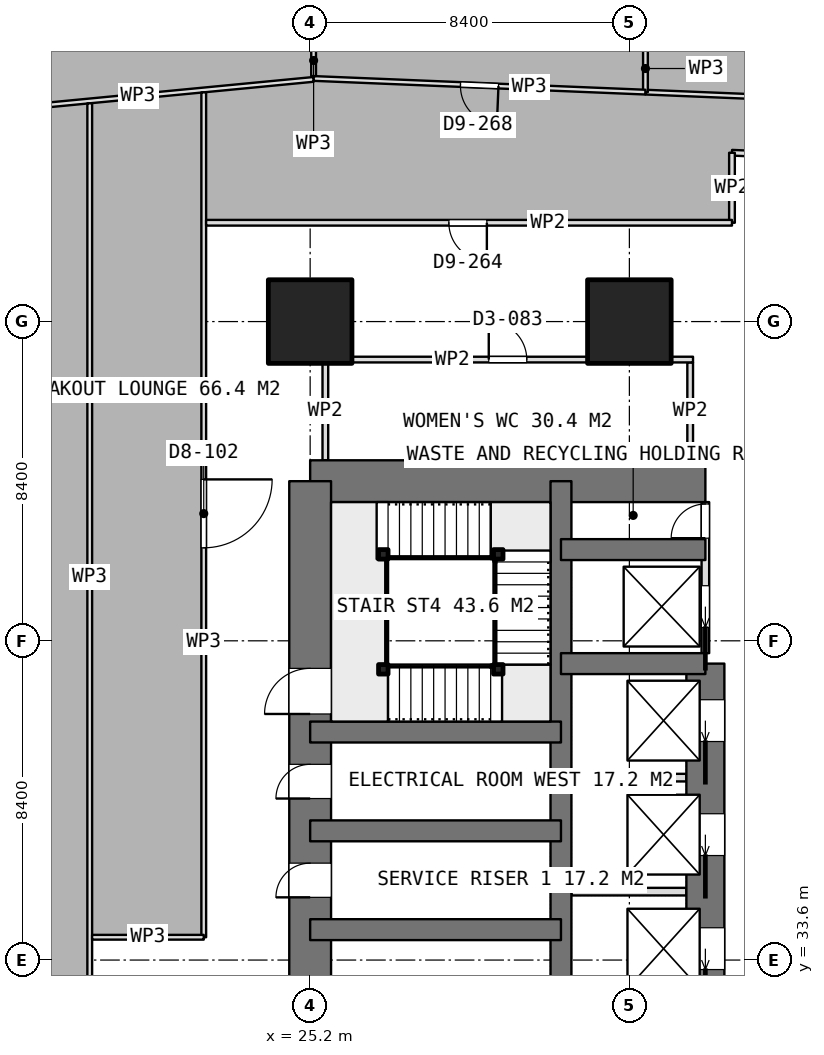
"""IFC4 building model, lengths in metres.
Left out: names, types, materials, properties, quantities, classifications, styles, units other than length and angle.
Written with IfcOpenShell. Run it as: python <this file> out.ifc"""

import sys

from ifc_helpers import new_model, si_unit, direction, frame, frame_2d, origin, origin_2d, place, context, subcontext, project, spatial, rectangle, extrude, element, fill, save


model = new_model("IFC4")
c1 = context("Model", 3, precision=1e-05, world=origin(), true_north=direction((0.0, 1.0)))
c2 = subcontext(c1, "Body", "Model", "MODEL_VIEW")
j1 = project(units=[si_unit("LENGTHUNIT", "METRE"), si_unit("PLANEANGLEUNIT", "RADIAN")], contexts=[c1])
p1 = place(None, origin())
s1 = spatial("IfcSite", under=j1, at=p1, CompositionType="ELEMENT")
p2 = place(p1, origin())
s2 = spatial("IfcBuilding", under=s1, at=p2, CompositionType="ELEMENT")
p3 = place(p2, frame((0.0, 0.0, 74.15)))
s3 = spatial("IfcBuildingStorey", under=s2, at=p3, CompositionType="ELEMENT", Elevation=74.15)
p4 = place(p3, frame((25.2, 46.2, 0.0), z_axis=(0.0, 0.0, 1.0), x_axis=(1.0, 0.0, 0.0)))
e1 = element("IfcWall", 1, at=p4, inside=s3, PredefinedType="SHEAR", context=c2, shape_type="SweptSolid", body=[
    extrude(rectangle(XDim=10.4, YDim=1.1, at=frame_2d((5.2, 0.0))), origin(), (0.0, 0.0, 1.0), 3.75),
])
p5 = place(p3, frame((25.2, 21.0, 0.0), z_axis=(0.0, 0.0, 1.0), x_axis=(0.0, 1.0, 0.0)))
e2 = element("IfcWall", 2, at=p5, inside=s3, PredefinedType="SHEAR", context=c2, shape_type="SweptSolid", body=[
    extrude(rectangle(XDim=25.2, YDim=1.1, at=frame_2d((12.6, 0.0))), origin(), (0.0, 0.0, 1.0), 3.75),
])
p6 = place(p5, frame((7.8, 0.0, 0.0)))
e3 = element("IfcOpeningElement", 3, at=p6, cuts=e2, PredefinedType="OPENING", context=c2, shape_type="SweptSolid", body=[
    extrude(rectangle(XDim=1.2, YDim=2.1, at=frame_2d((0.6, 1.05))), frame((0.0, 0.56, 0.0), z_axis=(0.0, -1.0, 0.0), x_axis=(1.0, 0.0, 0.0)), (0.0, 0.0, 1.0), 1.12),
])
p7 = place(p5, frame((14.25, 0.0, 0.0)))
e4 = element("IfcOpeningElement", 4, at=p7, cuts=e2, PredefinedType="OPENING", context=c2, shape_type="SweptSolid", body=[
    extrude(rectangle(XDim=0.9, YDim=2.1, at=frame_2d((0.45, 1.05))), frame((0.0, 0.56, 0.0), z_axis=(0.0, -1.0, 0.0), x_axis=(1.0, 0.0, 0.0)), (0.0, 0.0, 1.0), 1.12),
])
p8 = place(p5, frame((16.85, 0.0, 0.0)))
e5 = element("IfcOpeningElement", 5, at=p8, cuts=e2, PredefinedType="OPENING", context=c2, shape_type="SweptSolid", body=[
    extrude(rectangle(XDim=0.9, YDim=2.1, at=frame_2d((0.45, 1.05))), frame((0.0, 0.56, 0.0), z_axis=(0.0, -1.0, 0.0), x_axis=(1.0, 0.0, 0.0)), (0.0, 0.0, 1.0), 1.12),
])
p9 = place(p5, frame((19.075, 0.0, 0.0)))
e6 = element("IfcOpeningElement", 6, at=p9, cuts=e2, PredefinedType="OPENING", context=c2, shape_type="SweptSolid", body=[
    extrude(rectangle(XDim=1.2, YDim=2.1, at=frame_2d((0.6, 1.05))), frame((0.0, 0.56, 0.0), z_axis=(0.0, -1.0, 0.0), x_axis=(1.0, 0.0, 0.0)), (0.0, 0.0, 1.0), 1.12),
])
p10 = place(p3, frame((31.8, 21.0, 0.0), z_axis=(0.0, 0.0, 1.0), x_axis=(0.0, 1.0, 0.0)))
e7 = element("IfcWall", 7, at=p10, inside=s3, PredefinedType="SHEAR", context=c2, shape_type="SweptSolid", body=[
    extrude(rectangle(XDim=25.2, YDim=0.55, at=frame_2d((12.6, 0.0))), origin(), (0.0, 0.0, 1.0), 3.75),
])
p11 = place(p3, frame((35.6, 23.4, 0.0), z_axis=(0.0, 0.0, 1.0), x_axis=(0.0, 1.0, 0.0)))
e8 = element("IfcWall", 8, at=p11, inside=s3, PredefinedType="SHEAR", context=c2, shape_type="SweptSolid", body=[
    extrude(rectangle(XDim=18.0, YDim=1.0, at=frame_2d((9.0, 0.0))), origin(), (0.0, 0.0, 1.0), 3.75),
])
p12 = place(p11, frame((0.95, 0.0, 0.0)))
e9 = element("IfcOpeningElement", 9, at=p12, cuts=e8, PredefinedType="OPENING", context=c2, shape_type="SweptSolid", body=[
    extrude(rectangle(XDim=1.1, YDim=2.1, at=frame_2d((0.55, 1.05))), frame((0.0, 0.51, 0.0), z_axis=(0.0, -1.0, 0.0), x_axis=(1.0, 0.0, 0.0)), (0.0, 0.0, 1.0), 1.02),
])
p13 = place(p11, frame((3.95, 0.0, 0.0)))
e10 = element("IfcOpeningElement", 10, at=p13, cuts=e8, PredefinedType="OPENING", context=c2, shape_type="SweptSolid", body=[
    extrude(rectangle(XDim=1.1, YDim=2.1, at=frame_2d((0.55, 1.05))), frame((0.0, 0.51, 0.0), z_axis=(0.0, -1.0, 0.0), x_axis=(1.0, 0.0, 0.0)), (0.0, 0.0, 1.0), 1.02),
])
p14 = place(p11, frame((6.95, 0.0, 0.0)))
e11 = element("IfcOpeningElement", 11, at=p14, cuts=e8, PredefinedType="OPENING", context=c2, shape_type="SweptSolid", body=[
    extrude(rectangle(XDim=1.1, YDim=2.1, at=frame_2d((0.55, 1.05))), frame((0.0, 0.51, 0.0), z_axis=(0.0, -1.0, 0.0), x_axis=(1.0, 0.0, 0.0)), (0.0, 0.0, 1.0), 1.02),
])
p15 = place(p11, frame((9.95, 0.0, 0.0)))
e12 = element("IfcOpeningElement", 12, at=p15, cuts=e8, PredefinedType="OPENING", context=c2, shape_type="SweptSolid", body=[
    extrude(rectangle(XDim=1.1, YDim=2.1, at=frame_2d((0.55, 1.05))), frame((0.0, 0.51, 0.0), z_axis=(0.0, -1.0, 0.0), x_axis=(1.0, 0.0, 0.0)), (0.0, 0.0, 1.0), 1.02),
])
p16 = place(p11, frame((12.95, 0.0, 0.0)))
e13 = element("IfcOpeningElement", 13, at=p16, cuts=e8, PredefinedType="OPENING", context=c2, shape_type="SweptSolid", body=[
    extrude(rectangle(XDim=1.1, YDim=2.1, at=frame_2d((0.55, 1.05))), frame((0.0, 0.51, 0.0), z_axis=(0.0, -1.0, 0.0), x_axis=(1.0, 0.0, 0.0)), (0.0, 0.0, 1.0), 1.02),
])
p17 = place(p11, frame((15.95, 0.0, 0.0)))
e14 = element("IfcOpeningElement", 14, at=p17, cuts=e8, PredefinedType="OPENING", context=c2, shape_type="SweptSolid", body=[
    extrude(rectangle(XDim=1.1, YDim=2.1, at=frame_2d((0.55, 1.05))), frame((0.0, 0.51, 0.0), z_axis=(0.0, -1.0, 0.0), x_axis=(1.0, 0.0, 0.0)), (0.0, 0.0, 1.0), 1.02),
])
for number, where, z_axis, x_axis in (
    (15, (31.8, 41.4, 0.0), (0.0, 0.0, 1.0), (1.0, 0.0, 0.0)),
    (16, (31.8, 44.4, 0.0), (0.0, 0.0, 1.0), (1.0, 0.0, 0.0)),
):
    element("IfcWall", number, at=place(p3, frame(where, z_axis=z_axis, x_axis=x_axis)), inside=s3, PredefinedType="SHEAR", context=c2, shape_type="SweptSolid", body=[
        extrude(rectangle(XDim=3.8, YDim=0.55, at=frame_2d((1.9, 0.0))), origin(), (0.0, 0.0, 1.0), 3.75),
    ])
for number, where, z_axis, x_axis in (
    (17, (25.2, 34.4, 0.0), (0.0, 0.0, 1.0), (1.0, 0.0, 0.0)),
    (18, (25.2, 37.0, 0.0), (0.0, 0.0, 1.0), (1.0, 0.0, 0.0)),
    (19, (25.2, 39.6, 0.0), (0.0, 0.0, 1.0), (1.0, 0.0, 0.0)),
):
    element("IfcWall", number, at=place(p3, frame(where, z_axis=z_axis, x_axis=x_axis)), inside=s3, PredefinedType="SHEAR", context=c2, shape_type="SweptSolid", body=[
        extrude(rectangle(XDim=6.6, YDim=0.55, at=frame_2d((3.3, 0.0))), origin(), (0.0, 0.0, 1.0), 3.75),
    ])
for number, where, z_axis, x_axis in (
    (20, (25.2, 50.4, 0.0), (0.0, 0.0, 1.0), (1.0, 0.0, 0.0)),
    (21, (33.6, 50.4, 0.0), (0.0, 0.0, 1.0), (1.0, 0.0, 0.0)),
):
    element("IfcColumn", number, at=place(p3, frame(where, z_axis=z_axis, x_axis=x_axis)), inside=s3, PredefinedType="COLUMN", context=c2, shape_type="SweptSolid", body=[
        extrude(rectangle(XDim=2.2, YDim=2.2, at=origin_2d()), origin(), (0.0, 0.0, 1.0), 3.75),
    ])
for number, where, z_axis, x_axis in (
    (22, (32.075, 35.4, 0.0), (0.0, 0.0, 1.0), (1.0, 0.0, 0.0)),
    (23, (32.075, 38.4, 0.0), (0.0, 0.0, 1.0), (1.0, 0.0, 0.0)),
):
    element("IfcWall", number, at=place(p3, frame(where, z_axis=z_axis, x_axis=x_axis)), inside=s3, PredefinedType="PARTITIONING", context=c2, shape_type="SweptSolid", body=[
        extrude(rectangle(XDim=3.025, YDim=0.2, at=frame_2d((1.513, 0.0))), origin(), (0.0, 0.0, 1.0), 3.5),
    ])
p18 = place(p3, frame((35.6, 41.675, 0.0), z_axis=(0.0, 0.0, 1.0), x_axis=(0.0, 1.0, 0.0)))
e24 = element("IfcWall", 24, at=p18, inside=s3, PredefinedType="PARTITIONING", context=c2, shape_type="SweptSolid", body=[
    extrude(rectangle(XDim=3.975, YDim=0.2, at=frame_2d((1.987, 0.0))), origin(), (0.0, 0.0, 1.0), 3.5),
])
p19 = place(p18, frame((3.025, 0.0, 0.0)))
e25 = element("IfcOpeningElement", 25, at=p19, cuts=e24, PredefinedType="OPENING", context=c2, shape_type="SweptSolid", body=[
    extrude(rectangle(XDim=0.9, YDim=2.1, at=frame_2d((0.45, 1.05))), frame((0.0, 0.11, 0.0), z_axis=(0.0, -1.0, 0.0), x_axis=(1.0, 0.0, 0.0)), (0.0, 0.0, 1.0), 0.22),
])
p20 = place(p18, frame((0.675, 0.0, 0.0)))
e26 = element("IfcOpeningElement", 26, at=p20, cuts=e24, PredefinedType="OPENING", context=c2, shape_type="SweptSolid", body=[
    extrude(rectangle(XDim=1.1, YDim=2.1, at=frame_2d((0.55, 1.05))), frame((0.0, 0.11, 0.0), z_axis=(0.0, -1.0, 0.0), x_axis=(1.0, 0.0, 0.0)), (0.0, 0.0, 1.0), 0.22),
])
p21 = place(p3, frame((25.525, 49.4, 0.0), z_axis=(0.0, 0.0, 1.0), x_axis=(1.0, 0.0, 0.0)))
e27 = element("IfcWall", 27, at=p21, inside=s3, PredefinedType="PARTITIONING", context=c2, shape_type="SweptSolid", body=[
    extrude(rectangle(XDim=9.75, YDim=0.15, at=frame_2d((4.875, 0.0))), origin(), (0.0, 0.0, 1.0), 3.5),
])
p22 = place(p21, frame((4.375, 0.0, 0.0)))
e28 = element("IfcOpeningElement", 28, at=p22, cuts=e27, PredefinedType="OPENING", context=c2, shape_type="SweptSolid", body=[
    extrude(rectangle(XDim=1.0, YDim=2.1, at=frame_2d((0.5, 1.05))), frame((0.0, 0.085, 0.0), z_axis=(0.0, -1.0, 0.0), x_axis=(1.0, 0.0, 0.0)), (0.0, 0.0, 1.0), 0.17),
])
for number, where, z_axis, x_axis in (
    (29, (25.6, 46.75, 0.0), (0.0, 0.0, 1.0), (0.0, 1.0, 0.0)),
    (30, (35.2, 46.75, 0.0), (0.0, 0.0, 1.0), (0.0, 1.0, 0.0)),
):
    element("IfcWall", number, at=place(p3, frame(where, z_axis=z_axis, x_axis=x_axis)), inside=s3, PredefinedType="PARTITIONING", context=c2, shape_type="SweptSolid", body=[
        extrude(rectangle(XDim=2.575, YDim=0.15, at=frame_2d((1.288, 0.0))), origin(), (0.0, 0.0, 1.0), 3.5),
    ])
p23 = place(p3, frame((42.718, 56.078, 0.0), z_axis=(0.0, 0.0, 1.0), x_axis=(-0.99914812822, 0.041267637136, 0.0)))
e31 = element("IfcWall", 31, at=p23, inside=s3, PredefinedType="PARTITIONING", context=c2, shape_type="SweptSolid", body=[
    extrude(rectangle(XDim=8.702, YDim=0.125, at=frame_2d((4.351, 0.0))), origin(), (0.0, 0.0, 1.0), 3.5),
])
p24 = place(p23, frame((3.851, 0.0, 0.0)))
e32 = element("IfcOpeningElement", 32, at=p24, cuts=e31, PredefinedType="OPENING", context=c2, shape_type="SweptSolid", body=[
    extrude(rectangle(XDim=1.0, YDim=2.1, at=frame_2d((0.5, 1.05))), frame((0.0, 0.073, 0.0), z_axis=(0.0, -1.0, 0.0), x_axis=(1.0, 0.0, 0.0)), (0.0, 0.0, 1.0), 0.145),
])
p25 = place(p3, frame((34.023, 56.437, 0.0), z_axis=(0.0, 0.0, 1.0), x_axis=(0.0, 1.0, 0.0)))
e33 = element("IfcWall", 33, at=p25, inside=s3, PredefinedType="PARTITIONING", context=c2, shape_type="SweptSolid", body=[
    extrude(rectangle(XDim=1.243, YDim=0.125, at=frame_2d((0.622, 0.0))), origin(), (0.0, 0.0, 1.0), 3.5),
])
p26 = place(p3, frame((34.021, 56.437, 0.0), z_axis=(0.0, 0.0, 1.0), x_axis=(-0.999150892364, 0.041200658827, 0.0)))
e34 = element("IfcWall", 34, at=p26, inside=s3, PredefinedType="PARTITIONING", context=c2, shape_type="SweptSolid", body=[
    extrude(rectangle(XDim=8.74, YDim=0.125, at=frame_2d((4.37, 0.0))), origin(), (0.0, 0.0, 1.0), 3.5),
])
p27 = place(p26, frame((3.869, 0.0, 0.0)))
e35 = element("IfcOpeningElement", 35, at=p27, cuts=e34, PredefinedType="OPENING", context=c2, shape_type="SweptSolid", body=[
    extrude(rectangle(XDim=1.0, YDim=2.1, at=frame_2d((0.5, 1.05))), frame((0.0, 0.073, 0.0), z_axis=(0.0, -1.0, 0.0), x_axis=(1.0, 0.0, 0.0)), (0.0, 0.0, 1.0), 0.145),
])
p28 = place(p3, frame((25.291, 56.859, 0.0), z_axis=(0.0, 0.0, 1.0), x_axis=(0.0, 1.0, 0.0)))
e36 = element("IfcWall", 36, at=p28, inside=s3, PredefinedType="PARTITIONING", context=c2, shape_type="SweptSolid", body=[
    extrude(rectangle(XDim=0.821, YDim=0.125, at=frame_2d((0.411, 0.0))), origin(), (0.0, 0.0, 1.0), 3.5),
])
p29 = place(p3, frame((25.287, 56.772, 0.0), z_axis=(0.0, 0.0, 1.0), x_axis=(-0.995407630517, -0.095726950797, 0.0)))
e37 = element("IfcWall", 37, at=p29, inside=s3, PredefinedType="PARTITIONING", context=c2, shape_type="SweptSolid", body=[
    extrude(rectangle(XDim=9.276, YDim=0.125, at=frame_2d((4.638, 0.0))), origin(), (0.0, 0.0, 1.0), 3.5),
])
p30 = place(p3, frame((19.4, 56.143, 0.0), z_axis=(0.0, 0.0, 1.0), x_axis=(0.0, -1.0, 0.0)))
e38 = element("IfcWall", 38, at=p30, inside=s3, PredefinedType="PARTITIONING", context=c2, shape_type="SweptSolid", body=[
    extrude(rectangle(XDim=24.943, YDim=0.125, at=frame_2d((12.472, 0.0))), origin(), (0.0, 0.0, 1.0), 3.5),
])
p31 = place(p3, frame((22.4, 56.431, 0.0), z_axis=(0.0, 0.0, 1.0), x_axis=(0.0, -1.0, 0.0)))
e39 = element("IfcWall", 39, at=p31, inside=s3, PredefinedType="PARTITIONING", context=c2, shape_type="SweptSolid", body=[
    extrude(rectangle(XDim=22.231, YDim=0.125, at=frame_2d((11.115, 0.0))), origin(), (0.0, 0.0, 1.0), 3.5),
])
p32 = place(p31, frame((10.184, 0.0, 0.0)))
e40 = element("IfcOpeningElement", 40, at=p32, cuts=e39, PredefinedType="OPENING", context=c2, shape_type="SweptSolid", body=[
    extrude(rectangle(XDim=1.8, YDim=2.1, at=frame_2d((0.9, 1.05))), frame((0.0, 0.073, 0.0), z_axis=(0.0, -1.0, 0.0), x_axis=(1.0, 0.0, 0.0)), (0.0, 0.0, 1.0), 0.145),
])
p33 = place(p3, frame((22.4, 34.2, 0.0), z_axis=(0.0, 0.0, 1.0), x_axis=(-1.0, 0.0, 0.0)))
e41 = element("IfcWall", 41, at=p33, inside=s3, PredefinedType="PARTITIONING", context=c2, shape_type="SweptSolid", body=[
    extrude(rectangle(XDim=2.938, YDim=0.125, at=frame_2d((1.469, 0.0))), origin(), (0.0, 0.0, 1.0), 3.5),
])
p34 = place(p3, frame((39.3, 54.718, 0.0), z_axis=(0.0, 0.0, 1.0), x_axis=(-0.999146548644, 0.041305863176, 0.0)))
e42 = element("IfcWall", 42, at=p34, inside=s3, PredefinedType="PARTITIONING", context=c2, shape_type="SweptSolid", body=[
    extrude(rectangle(XDim=3.002, YDim=0.15, at=frame_2d((1.501, 0.0))), origin(), (0.0, 0.0, 1.0), 3.5),
])
p35 = place(p3, frame((36.3, 54.842, 0.0), z_axis=(0.0, 0.0, 1.0), x_axis=(0.0, -1.0, 0.0)))
e43 = element("IfcWall", 43, at=p35, inside=s3, PredefinedType="PARTITIONING", context=c2, shape_type="SweptSolid", body=[
    extrude(rectangle(XDim=1.842, YDim=0.15, at=frame_2d((0.921, 0.0))), origin(), (0.0, 0.0, 1.0), 3.5),
])
p36 = place(p3, frame((36.3, 53.0, 0.0), z_axis=(0.0, 0.0, 1.0), x_axis=(-1.0, 0.0, 0.0)))
e44 = element("IfcWall", 44, at=p36, inside=s3, PredefinedType="PARTITIONING", context=c2, shape_type="SweptSolid", body=[
    extrude(rectangle(XDim=13.838, YDim=0.15, at=frame_2d((6.919, 0.0))), origin(), (0.0, 0.0, 1.0), 3.5),
])
p37 = place(p36, frame((6.45, 0.0, 0.0)))
e45 = element("IfcOpeningElement", 45, at=p37, cuts=e44, PredefinedType="OPENING", context=c2, shape_type="SweptSolid", body=[
    extrude(rectangle(XDim=1.0, YDim=2.1, at=frame_2d((0.5, 1.05))), frame((0.0, 0.085, 0.0), z_axis=(0.0, -1.0, 0.0), x_axis=(1.0, 0.0, 0.0)), (0.0, 0.0, 1.0), 0.17),
])
for number, where, z_axis, x_axis in (
    (46, (27.125, 41.25, 0.0), (0.0, 0.0, 1.0), (1.0, 0.0, 0.0)),
    (47, (30.15, 41.25, 0.0), (0.0, 0.0, 1.0), (1.0, 0.0, 0.0)),
    (48, (30.15, 44.275, 0.0), (0.0, 0.0, 1.0), (1.0, 0.0, 0.0)),
    (49, (27.125, 44.275, 0.0), (0.0, 0.0, 1.0), (1.0, 0.0, 0.0)),
):
    element("IfcColumn", number, at=place(p3, frame(where, z_axis=z_axis, x_axis=x_axis)), inside=s3, PredefinedType="COLUMN", context=c2, shape_type="SweptSolid", body=[
        extrude(rectangle(XDim=0.25, YDim=0.25, at=origin_2d()), origin(), (0.0, 0.0, 1.0), 3.75),
    ])
p38 = place(p7, origin())
e50 = element("IfcDoor", 50, at=p38, inside=s3, OperationType="SINGLE_SWING_LEFT", PredefinedType="DOOR", context=c2, shape_type="SweptSolid", body=[
    extrude(rectangle(XDim=0.9, YDim=2.1, at=frame_2d((0.45, 1.05))), frame((0.0, 0.025, 0.0), z_axis=(0.0, -1.0, 0.0), x_axis=(1.0, 0.0, 0.0)), (0.0, 0.0, 1.0), 0.05),
])
fill(e4, e50)
p39 = place(p8, origin())
e51 = element("IfcDoor", 51, at=p39, inside=s3, OperationType="SINGLE_SWING_LEFT", PredefinedType="DOOR", context=c2, shape_type="SweptSolid", body=[
    extrude(rectangle(XDim=0.9, YDim=2.1, at=frame_2d((0.45, 1.05))), frame((0.0, 0.025, 0.0), z_axis=(0.0, -1.0, 0.0), x_axis=(1.0, 0.0, 0.0)), (0.0, 0.0, 1.0), 0.05),
])
fill(e5, e51)
p40 = place(p19, origin())
e52 = element("IfcDoor", 52, at=p40, inside=s3, OperationType="SINGLE_SWING_LEFT", PredefinedType="DOOR", context=c2, shape_type="SweptSolid", body=[
    extrude(rectangle(XDim=0.9, YDim=2.1, at=frame_2d((0.45, 1.05))), frame((0.0, 0.025, 0.0), z_axis=(0.0, -1.0, 0.0), x_axis=(1.0, 0.0, 0.0)), (0.0, 0.0, 1.0), 0.05),
])
fill(e25, e52)
p41 = place(p15, origin())
e53 = element("IfcDoor", 53, at=p41, inside=s3, OperationType="SLIDING_TO_LEFT", PredefinedType="USERDEFINED", context=c2, shape_type="SweptSolid", body=[
    extrude(rectangle(XDim=1.1, YDim=2.1, at=frame_2d((0.55, 1.05))), frame((0.0, 0.025, 0.0), z_axis=(0.0, -1.0, 0.0), x_axis=(1.0, 0.0, 0.0)), (0.0, 0.0, 1.0), 0.05),
])
fill(e12, e53)
p42 = place(p16, origin())
e54 = element("IfcDoor", 54, at=p42, inside=s3, OperationType="SLIDING_TO_LEFT", PredefinedType="USERDEFINED", context=c2, shape_type="SweptSolid", body=[
    extrude(rectangle(XDim=1.1, YDim=2.1, at=frame_2d((0.55, 1.05))), frame((0.0, 0.025, 0.0), z_axis=(0.0, -1.0, 0.0), x_axis=(1.0, 0.0, 0.0)), (0.0, 0.0, 1.0), 0.05),
])
fill(e13, e54)
p43 = place(p17, origin())
e55 = element("IfcDoor", 55, at=p43, inside=s3, OperationType="SLIDING_TO_LEFT", PredefinedType="USERDEFINED", context=c2, shape_type="SweptSolid", body=[
    extrude(rectangle(XDim=1.1, YDim=2.1, at=frame_2d((0.55, 1.05))), frame((0.0, 0.025, 0.0), z_axis=(0.0, -1.0, 0.0), x_axis=(1.0, 0.0, 0.0)), (0.0, 0.0, 1.0), 0.05),
])
fill(e14, e55)
p44 = place(p20, origin())
e56 = element("IfcDoor", 56, at=p44, inside=s3, OperationType="SLIDING_TO_LEFT", PredefinedType="USERDEFINED", context=c2, shape_type="SweptSolid", body=[
    extrude(rectangle(XDim=1.1, YDim=2.1, at=frame_2d((0.55, 1.05))), frame((0.0, 0.025, 0.0), z_axis=(0.0, -1.0, 0.0), x_axis=(1.0, 0.0, 0.0)), (0.0, 0.0, 1.0), 0.05),
])
fill(e26, e56)
p45 = place(p22, origin())
e57 = element("IfcDoor", 57, at=p45, inside=s3, OperationType="SINGLE_SWING_LEFT", PredefinedType="DOOR", context=c2, shape_type="SweptSolid", body=[
    extrude(rectangle(XDim=1.0, YDim=2.1, at=frame_2d((0.5, 1.05))), frame((0.0, 0.025, 0.0), z_axis=(0.0, -1.0, 0.0), x_axis=(1.0, 0.0, 0.0)), (0.0, 0.0, 1.0), 0.05),
])
fill(e28, e57)
p46 = place(p27, origin())
e58 = element("IfcDoor", 58, at=p46, inside=s3, OperationType="SINGLE_SWING_LEFT", PredefinedType="DOOR", context=c2, shape_type="SweptSolid", body=[
    extrude(rectangle(XDim=1.0, YDim=2.1, at=frame_2d((0.5, 1.05))), frame((0.0, 0.025, 0.0), z_axis=(0.0, -1.0, 0.0), x_axis=(1.0, 0.0, 0.0)), (0.0, 0.0, 1.0), 0.05),
])
fill(e35, e58)
p47 = place(p32, origin())
e59 = element("IfcDoor", 59, at=p47, inside=s3, OperationType="DOUBLE_DOOR_SINGLE_SWING", PredefinedType="DOOR", context=c2, shape_type="SweptSolid", body=[
    extrude(rectangle(XDim=1.8, YDim=2.1, at=frame_2d((0.9, 1.05))), frame((0.0, 0.025, 0.0), z_axis=(0.0, -1.0, 0.0), x_axis=(1.0, 0.0, 0.0)), (0.0, 0.0, 1.0), 0.05),
])
fill(e40, e59)
p48 = place(p37, origin())
e60 = element("IfcDoor", 60, at=p48, inside=s3, OperationType="SINGLE_SWING_LEFT", PredefinedType="DOOR", context=c2, shape_type="SweptSolid", body=[
    extrude(rectangle(XDim=1.0, YDim=2.1, at=frame_2d((0.5, 1.05))), frame((0.0, 0.025, 0.0), z_axis=(0.0, -1.0, 0.0), x_axis=(1.0, 0.0, 0.0)), (0.0, 0.0, 1.0), 0.05),
])
fill(e45, e60)
p49 = place(p9, origin())
e61 = element("IfcDoor", 61, at=p49, inside=s3, OperationType="SINGLE_SWING_RIGHT", PredefinedType="DOOR", context=c2, shape_type="SweptSolid", body=[
    extrude(rectangle(XDim=1.2, YDim=2.1, at=frame_2d((0.6, 1.05))), frame((0.0, 0.025, 0.0), z_axis=(0.0, -1.0, 0.0), x_axis=(1.0, 0.0, 0.0)), (0.0, 0.0, 1.0), 0.05),
])
fill(e6, e61)
save(model, sys.argv[1])
